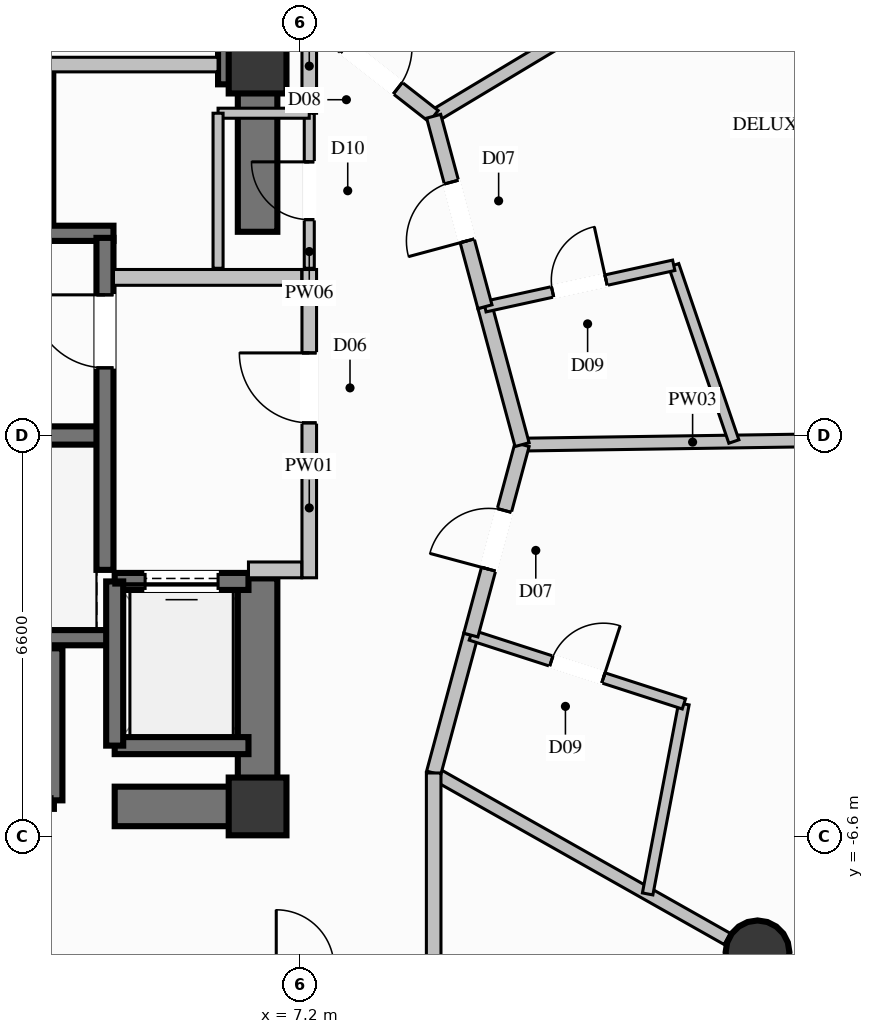
"""IFC4 building model, lengths in metres.
Left out: names, types, materials, properties, quantities, classifications, styles, units other than length and angle.
Written with IfcOpenShell. Run it as: python <this file> out.ifc"""

import sys

from ifc_helpers import new_model, si_unit, direction, frame, frame_2d, origin, origin_2d, place, context, subcontext, project, spatial, rectangle, circle, extrude, element, fill, save


model = new_model("IFC4")
c1 = context("Model", 3, precision=1e-05, world=origin(), true_north=direction((0.0, 1.0)))
c2 = subcontext(c1, "Body", "Model", "MODEL_VIEW")
j1 = project(units=[si_unit("LENGTHUNIT", "METRE"), si_unit("PLANEANGLEUNIT", "RADIAN")], contexts=[c1])
p1 = place(None, origin())
s1 = spatial("IfcSite", under=j1, at=p1, CompositionType="ELEMENT")
p2 = place(p1, origin())
s2 = spatial("IfcBuilding", under=s1, at=p2, CompositionType="ELEMENT")
p3 = place(p2, frame((0.0, 0.0, 124.2)))
s3 = spatial("IfcBuildingStorey", under=s2, at=p3, CompositionType="ELEMENT", Elevation=124.2)
for number, where, z_axis, x_axis in (
    (1, (6.5, -6.1, 0.0), (0.0, 0.0, 1.0), (1.0, 0.0, 0.0)),
    (2, (6.5, 6.1, 0.0), (0.0, 0.0, 1.0), (1.0, 0.0, 0.0)),
):
    element("IfcColumn", number, at=place(p3, frame(where, z_axis=z_axis, x_axis=x_axis)), inside=s3, PredefinedType="COLUMN", context=c2, shape_type="SweptSolid", body=[
        extrude(rectangle(XDim=0.95, YDim=0.95, at=origin_2d()), origin(), (0.0, 0.0, 1.0), 3.6),
    ])
p4 = place(p3, frame((-3.99, 0.0, 0.0), z_axis=(0.0, 0.0, 1.0), x_axis=(1.0, 0.0, 0.0)))
e3 = element("IfcWall", 3, at=p4, inside=s3, PredefinedType="SHEAR", context=c2, shape_type="SweptSolid", body=[
    extrude(rectangle(XDim=7.98, YDim=0.3, at=frame_2d((3.99, 0.0))), origin(), (0.0, 0.0, 1.0), 3.6),
])
for number, where, z_axis, x_axis in (
    (4, (-4.13, -3.325, 0.0), (0.0, 0.0, 1.0), (1.0, 0.0, 0.0)),
    (5, (-4.13, 3.325, 0.0), (0.0, 0.0, 1.0), (1.0, 0.0, 0.0)),
):
    element("IfcWall", number, at=place(p3, frame(where, z_axis=z_axis, x_axis=x_axis)), inside=s3, PredefinedType="SOLIDWALL", context=c2, shape_type="SweptSolid", body=[
        extrude(rectangle(XDim=8.26, YDim=0.25, at=frame_2d((4.13, 0.0))), origin(), (0.0, 0.0, 1.0), 3.6),
    ])
p5 = place(p3, frame((4.15, -6.1, 0.0), z_axis=(0.0, 0.0, 1.0), x_axis=(1.0, 0.0, 0.0)))
e6 = element("IfcWall", 6, at=p5, inside=s3, PredefinedType="SHEAR", context=c2, shape_type="SweptSolid", body=[
    extrude(rectangle(XDim=2.025, YDim=0.65, at=frame_2d((1.013, 0.0))), origin(), (0.0, 0.0, 1.0), 3.6),
])
p6 = place(p3, frame((5.85, 6.1, 0.0), z_axis=(0.0, 0.0, 1.0), x_axis=(1.0, 0.0, 0.0)))
e7 = element("IfcWall", 7, at=p6, inside=s3, PredefinedType="SHEAR", context=c2, shape_type="SweptSolid", body=[
    extrude(rectangle(XDim=0.325, YDim=0.65, at=frame_2d((0.163, 0.0))), origin(), (0.0, 0.0, 1.0), 3.6),
])
p7 = place(p3, frame((6.5, -6.425, 0.0), z_axis=(0.0, 0.0, 1.0), x_axis=(0.0, 1.0, 0.0)))
e8 = element("IfcWall", 8, at=p7, inside=s3, PredefinedType="SHEAR", context=c2, shape_type="SweptSolid", body=[
    extrude(rectangle(XDim=4.075, YDim=0.65, at=frame_2d((2.038, 0.0))), origin(), (0.0, 0.0, 1.0), 3.6),
])
p8 = place(p3, frame((6.5, 3.35, 0.0), z_axis=(0.0, 0.0, 1.0), x_axis=(0.0, 1.0, 0.0)))
e9 = element("IfcWall", 9, at=p8, inside=s3, PredefinedType="SHEAR", context=c2, shape_type="SweptSolid", body=[
    extrude(rectangle(XDim=3.075, YDim=0.65, at=frame_2d((1.538, 0.0))), origin(), (0.0, 0.0, 1.0), 3.6),
])
p9 = place(p3, frame((14.722, -8.5, 0.0), z_axis=(0.0, 0.0, 1.0), x_axis=(1.0, 0.0, 0.0)))
e10 = element("IfcColumn", 10, at=p9, inside=s3, PredefinedType="COLUMN", context=c2, shape_type="SweptSolid", body=[
    extrude(circle(Radius=0.525, at=origin_2d()), origin(), (0.0, 0.0, 1.0), 3.6),
])
p10 = place(p3, frame((1.05, -6.0, 0.0), z_axis=(0.0, 0.0, 1.0), x_axis=(1.0, 0.0, 0.0)))
e11 = element("IfcWall", 11, at=p10, inside=s3, PredefinedType="SOLIDWALL", context=c2, shape_type="SweptSolid", body=[
    extrude(rectangle(XDim=2.1, YDim=0.28, at=frame_2d((1.05, 0.0))), origin(), (0.0, 0.0, 1.0), 3.35),
])
p11 = place(p10, frame((0.5, 0.0, 0.0)))
e12 = element("IfcOpeningElement", 12, at=p11, cuts=e11, PredefinedType="OPENING", context=c2, shape_type="SweptSolid", body=[
    extrude(rectangle(XDim=1.1, YDim=2.2, at=frame_2d((0.55, 1.1))), frame((0.0, 0.15, 0.0), z_axis=(0.0, -1.0, 0.0), x_axis=(1.0, 0.0, 0.0)), (0.0, 0.0, 1.0), 0.3),
])
for number, where, z_axis, x_axis in (
    (13, (3.15, -6.0, 0.0), (0.0, 0.0, 1.0), (0.0, 1.0, 0.0)),
    (14, (3.0, 3.5, 0.0), (0.0, 0.0, 1.0), (0.0, 1.0, 0.0)),
):
    element("IfcWall", number, at=place(p3, frame(where, z_axis=z_axis, x_axis=x_axis)), inside=s3, PredefinedType="SOLIDWALL", context=c2, shape_type="SweptSolid", body=[
        extrude(rectangle(XDim=2.5, YDim=0.28, at=frame_2d((1.25, 0.0))), origin(), (0.0, 0.0, 1.0), 3.35),
    ])
p12 = place(p3, frame((4.15, -5.1, 0.0), z_axis=(0.0, 0.0, 1.0), x_axis=(1.0, 0.0, 0.0)))
e15 = element("IfcWall", 15, at=p12, inside=s3, PredefinedType="SOLIDWALL", context=c2, shape_type="SweptSolid", body=[
    extrude(rectangle(XDim=2.2, YDim=0.28, at=frame_2d((1.1, 0.0))), origin(), (0.0, 0.0, 1.0), 3.35),
])
p13 = place(p3, frame((6.35, -2.4, 0.0), z_axis=(0.0, 0.0, 1.0), x_axis=(-1.0, 0.0, 0.0)))
e16 = element("IfcWall", 16, at=p13, inside=s3, PredefinedType="SOLIDWALL", context=c2, shape_type="SweptSolid", body=[
    extrude(rectangle(XDim=2.2, YDim=0.28, at=frame_2d((1.1, 0.0))), origin(), (0.0, 0.0, 1.0), 3.35),
])
p14 = place(p13, frame((0.5, 0.0, 0.0)))
e17 = element("IfcOpeningElement", 17, at=p14, cuts=e16, PredefinedType="OPENING", context=c2, shape_type="SweptSolid", body=[
    extrude(rectangle(XDim=1.2, YDim=2.2, at=frame_2d((0.6, 1.1))), frame((0.0, 0.15, 0.0), z_axis=(0.0, -1.0, 0.0), x_axis=(1.0, 0.0, 0.0)), (0.0, 0.0, 1.0), 0.3),
])
p15 = place(p3, frame((4.15, -2.4, 0.0), z_axis=(0.0, 0.0, 1.0), x_axis=(0.0, -1.0, 0.0)))
e18 = element("IfcWall", 18, at=p15, inside=s3, PredefinedType="SOLIDWALL", context=c2, shape_type="SweptSolid", body=[
    extrude(rectangle(XDim=2.7, YDim=0.28, at=frame_2d((1.35, 0.0))), origin(), (0.0, 0.0, 1.0), 3.35),
])
p16 = place(p3, frame((3.99, -2.21, 0.0), z_axis=(0.0, 0.0, 1.0), x_axis=(0.0, 1.0, 0.0)))
e19 = element("IfcWall", 19, at=p16, inside=s3, PredefinedType="SOLIDWALL", context=c2, shape_type="SweptSolid", body=[
    extrude(rectangle(XDim=5.46, YDim=0.28, at=frame_2d((2.73, 0.0))), origin(), (0.0, 0.0, 1.0), 3.35),
])
p17 = place(p16, frame((3.323, 0.0, 0.0)))
e20 = element("IfcOpeningElement", 20, at=p17, cuts=e19, PredefinedType="OPENING", context=c2, shape_type="SweptSolid", body=[
    extrude(rectangle(XDim=1.2, YDim=2.2, at=frame_2d((0.6, 1.1))), frame((0.0, 0.15, 0.0), z_axis=(0.0, -1.0, 0.0), x_axis=(1.0, 0.0, 0.0)), (0.0, 0.0, 1.0), 0.3),
])
p18 = place(p3, frame((7.35, -2.34, 0.0), z_axis=(0.0, 0.0, 1.0), x_axis=(0.0, 1.0, 0.0)))
e21 = element("IfcWall", 21, at=p18, inside=s3, PredefinedType="PARTITIONING", context=c2, shape_type="SweptSolid", body=[
    extrude(rectangle(XDim=5.07, YDim=0.24, at=frame_2d((2.535, 0.0))), origin(), (0.0, 0.0, 1.0), 2.435),
])
p19 = place(p18, frame((2.548, 0.0, 0.0)))
e22 = element("IfcOpeningElement", 22, at=p19, cuts=e21, PredefinedType="OPENING", context=c2, shape_type="SweptSolid", body=[
    extrude(rectangle(XDim=1.15, YDim=2.2, at=frame_2d((0.575, 1.1))), frame((0.0, 0.13, 0.0), z_axis=(0.0, -1.0, 0.0), x_axis=(1.0, 0.0, 0.0)), (0.0, 0.0, 1.0), 0.26),
])
p20 = place(p3, frame((6.35, -2.21, 0.0), z_axis=(0.0, 0.0, 1.0), x_axis=(1.0, 0.0, 0.0)))
e23 = element("IfcWall", 23, at=p20, inside=s3, PredefinedType="PARTITIONING", context=c2, shape_type="SweptSolid", body=[
    extrude(rectangle(XDim=0.875, YDim=0.26, at=frame_2d((0.438, 0.0))), origin(), (0.0, 0.0, 1.0), 3.35),
])
p21 = place(p3, frame((4.13, 2.6, 0.0), z_axis=(0.0, 0.0, 1.0), x_axis=(1.0, 0.0, 0.0)))
e24 = element("IfcWall", 24, at=p21, inside=s3, PredefinedType="PARTITIONING", context=c2, shape_type="SweptSolid", body=[
    extrude(rectangle(XDim=3.095, YDim=0.26, at=frame_2d((1.548, 0.0))), origin(), (0.0, 0.0, 1.0), 3.35),
])
p22 = place(p3, frame((7.35, 5.3, 0.0), z_axis=(0.0, 0.0, 1.0), x_axis=(0.0, 1.0, 0.0)))
e25 = element("IfcWall", 25, at=p22, inside=s3, PredefinedType="PARTITIONING", context=c2, shape_type="SweptSolid", body=[
    extrude(rectangle(XDim=1.55, YDim=0.24, at=frame_2d((0.775, 0.0))), origin(), (0.0, 0.0, 1.0), 2.435),
])
p23 = place(p3, frame((3.0, 6.1, 0.0), z_axis=(0.0, 0.0, 1.0), x_axis=(1.0, 0.0, 0.0)))
e26 = element("IfcWall", 26, at=p23, inside=s3, PredefinedType="PARTITIONING", context=c2, shape_type="SweptSolid", body=[
    extrude(rectangle(XDim=2.85, YDim=0.24, at=frame_2d((1.425, 0.0))), origin(), (0.0, 0.0, 1.0), 2.435),
])
p24 = place(p3, frame((7.35, 2.75, 0.0), z_axis=(0.0, 0.0, 1.0), x_axis=(0.0, 1.0, 0.0)))
e27 = element("IfcWall", 27, at=p24, inside=s3, PredefinedType="PARTITIONING", context=c2, shape_type="SweptSolid", body=[
    extrude(rectangle(XDim=2.55, YDim=0.165, at=frame_2d((1.275, 0.0))), origin(), (0.0, 0.0, 1.0), 3.35),
])
p25 = place(p24, frame((0.8, 0.0, 0.0)))
e28 = element("IfcOpeningElement", 28, at=p25, cuts=e27, PredefinedType="OPENING", context=c2, shape_type="SweptSolid", body=[
    extrude(rectangle(XDim=0.95, YDim=2.1, at=frame_2d((0.475, 1.05))), frame((0.0, 0.093, 0.0), z_axis=(0.0, -1.0, 0.0), x_axis=(1.0, 0.0, 0.0)), (0.0, 0.0, 1.0), 0.185),
])
p26 = place(p3, frame((7.35, 5.3, 0.0), z_axis=(0.0, 0.0, 1.0), x_axis=(-1.0, 0.0, 0.0)))
e29 = element("IfcWall", 29, at=p26, inside=s3, PredefinedType="PARTITIONING", context=c2, shape_type="SweptSolid", body=[
    extrude(rectangle(XDim=1.5, YDim=0.165, at=frame_2d((0.75, 0.0))), origin(), (0.0, 0.0, 1.0), 2.435),
])
p27 = place(p3, frame((5.85, 5.3, 0.0), z_axis=(0.0, 0.0, 1.0), x_axis=(0.0, -1.0, 0.0)))
e30 = element("IfcWall", 30, at=p27, inside=s3, PredefinedType="PARTITIONING", context=c2, shape_type="SweptSolid", body=[
    extrude(rectangle(XDim=2.55, YDim=0.165, at=frame_2d((1.275, 0.0))), origin(), (0.0, 0.0, 1.0), 2.435),
])
p28 = place(p3, frame((10.85, -0.15, 0.0), z_axis=(0.0, 0.0, 1.0), x_axis=(0.999893703948, 0.014580151076, 0.0)))
e31 = element("IfcWall", 31, at=p28, inside=s3, PredefinedType="PARTITIONING", context=c2, shape_type="SweptSolid", body=[
    extrude(rectangle(XDim=5.609, YDim=0.21, at=frame_2d((2.805, 0.0))), origin(), (0.0, 0.0, 1.0), 3.35),
])
p29 = place(p3, frame((9.396, 5.25, 0.0), z_axis=(0.0, 0.0, 1.0), x_axis=(0.857379456535, 0.514684823471, 0.0)))
e32 = element("IfcWall", 32, at=p29, inside=s3, PredefinedType="PARTITIONING", context=c2, shape_type="SweptSolid", body=[
    extrude(rectangle(XDim=5.697, YDim=0.21, at=frame_2d((2.848, 0.0))), origin(), (0.0, 0.0, 1.0), 2.791),
])
p30 = place(p3, frame((9.396, -5.55, 0.0), z_axis=(0.0, 0.0, 1.0), x_axis=(0.870557919432, -0.492065959922, 0.0)))
e33 = element("IfcWall", 33, at=p30, inside=s3, PredefinedType="PARTITIONING", context=c2, shape_type="SweptSolid", body=[
    extrude(rectangle(XDim=5.546, YDim=0.21, at=frame_2d((2.773, 0.0))), origin(), (0.0, 0.0, 1.0), 2.791),
])
p31 = place(p3, frame((7.35, 6.85, 0.0), z_axis=(0.0, 0.0, 1.0), x_axis=(0.7876993483, -0.6160598483, 0.0)))
e34 = element("IfcWall", 34, at=p31, inside=s3, PredefinedType="PARTITIONING", context=c2, shape_type="SweptSolid", body=[
    extrude(rectangle(XDim=2.597, YDim=0.24, at=frame_2d((1.299, 0.0))), origin(), (0.0, 0.0, 1.0), 3.35),
])
p32 = place(p31, frame((0.749, 0.0, 0.0)))
e35 = element("IfcOpeningElement", 35, at=p32, cuts=e34, PredefinedType="OPENING", context=c2, shape_type="SweptSolid", body=[
    extrude(rectangle(XDim=1.1, YDim=2.3, at=frame_2d((0.55, 1.15))), frame((0.0, 0.13, 0.0), z_axis=(0.0, -1.0, 0.0), x_axis=(1.0, 0.0, 0.0)), (0.0, 0.0, 1.0), 0.26),
])
p33 = place(p3, frame((9.396, -5.55, 0.0), z_axis=(0.0, 0.0, 1.0), x_axis=(0.260152382661, 0.965567572879, 0.0)))
e36 = element("IfcWall", 36, at=p33, inside=s3, PredefinedType="PARTITIONING", context=c2, shape_type="SweptSolid", body=[
    extrude(rectangle(XDim=2.349, YDim=0.24, at=frame_2d((1.174, 0.0))), origin(), (0.0, 0.0, 1.0), 3.35),
])
p34 = place(p3, frame((12.915, -7.539, 0.0), z_axis=(0.0, 0.0, 1.0), x_axis=(0.187327216093, 0.982297569024, 0.0)))
e37 = element("IfcWall", 37, at=p34, inside=s3, PredefinedType="PLUMBINGWALL", context=c2, shape_type="SweptSolid", body=[
    extrude(rectangle(XDim=3.181, YDim=0.175, at=frame_2d((1.591, 0.0))), origin(), (0.0, 0.0, 1.0), 3.35),
])
p35 = place(p3, frame((10.007, -3.282, 0.0), z_axis=(0.0, 0.0, 1.0), x_axis=(0.951566663579, -0.307442490177, 0.0)))
e38 = element("IfcWall", 38, at=p35, inside=s3, PredefinedType="PLUMBINGWALL", context=c2, shape_type="SweptSolid", body=[
    extrude(rectangle(XDim=3.682, YDim=0.175, at=frame_2d((1.841, 0.0))), origin(), (0.0, 0.0, 1.0), 3.35),
])
p36 = place(p35, frame((1.391, 0.0, 0.0)))
e39 = element("IfcOpeningElement", 39, at=p36, cuts=e38, PredefinedType="OPENING", context=c2, shape_type="SweptSolid", body=[
    extrude(rectangle(XDim=0.9, YDim=2.1, at=frame_2d((0.45, 1.05))), frame((0.0, 0.098, 0.0), z_axis=(0.0, -1.0, 0.0), x_axis=(1.0, 0.0, 0.0)), (0.0, 0.0, 1.0), 0.195),
])
p37 = place(p3, frame((10.007, -3.282, 0.0), z_axis=(0.0, 0.0, 1.0), x_axis=(0.259905989708, 0.965633924691, 0.0)))
e40 = element("IfcWall", 40, at=p37, inside=s3, PredefinedType="PARTITIONING", context=c2, shape_type="SweptSolid", body=[
    extrude(rectangle(XDim=3.244, YDim=0.24, at=frame_2d((1.622, 0.0))), origin(), (0.0, 0.0, 1.0), 2.985),
])
p38 = place(p37, frame((1.122, 0.0, 0.0)))
e41 = element("IfcOpeningElement", 41, at=p38, cuts=e40, PredefinedType="OPENING", context=c2, shape_type="SweptSolid", body=[
    extrude(rectangle(XDim=1.0, YDim=2.2, at=frame_2d((0.5, 1.1))), frame((0.0, 0.13, 0.0), z_axis=(0.0, -1.0, 0.0), x_axis=(1.0, 0.0, 0.0)), (0.0, 0.0, 1.0), 0.26),
])
p39 = place(p3, frame((10.85, -0.15, 0.0), z_axis=(0.0, 0.0, 1.0), x_axis=(-0.260178493416, 0.965560537493, 0.0)))
e42 = element("IfcWall", 42, at=p39, inside=s3, PredefinedType="PARTITIONING", context=c2, shape_type="SweptSolid", body=[
    extrude(rectangle(XDim=2.349, YDim=0.24, at=frame_2d((1.174, 0.0))), origin(), (0.0, 0.0, 1.0), 2.985),
])
p40 = place(p3, frame((14.333, -0.099, 0.0), z_axis=(0.0, 0.0, 1.0), x_axis=(-0.322964477687, 0.946411087294, 0.0)))
e43 = element("IfcWall", 43, at=p40, inside=s3, PredefinedType="PLUMBINGWALL", context=c2, shape_type="SweptSolid", body=[
    extrude(rectangle(XDim=3.062, YDim=0.175, at=frame_2d((1.531, 0.0))), origin(), (0.0, 0.0, 1.0), 3.35),
])
p41 = place(p3, frame((10.239, 2.118, 0.0), z_axis=(0.0, 0.0, 1.0), x_axis=(0.976772579837, 0.214278620675, 0.0)))
e44 = element("IfcWall", 44, at=p41, inside=s3, PredefinedType="PLUMBINGWALL", context=c2, shape_type="SweptSolid", body=[
    extrude(rectangle(XDim=3.179, YDim=0.175, at=frame_2d((1.589, 0.0))), origin(), (0.0, 0.0, 1.0), 3.35),
])
p42 = place(p41, frame((1.139, 0.0, 0.0)))
e45 = element("IfcOpeningElement", 45, at=p42, cuts=e44, PredefinedType="OPENING", context=c2, shape_type="SweptSolid", body=[
    extrude(rectangle(XDim=0.9, YDim=2.1, at=frame_2d((0.45, 1.05))), frame((0.0, 0.098, 0.0), z_axis=(0.0, -1.0, 0.0), x_axis=(1.0, 0.0, 0.0)), (0.0, 0.0, 1.0), 0.195),
])
p43 = place(p3, frame((10.239, 2.118, 0.0), z_axis=(0.0, 0.0, 1.0), x_axis=(-0.259905989708, 0.965633924691, 0.0)))
e46 = element("IfcWall", 46, at=p43, inside=s3, PredefinedType="PARTITIONING", context=c2, shape_type="SweptSolid", body=[
    extrude(rectangle(XDim=3.244, YDim=0.24, at=frame_2d((1.622, 0.0))), origin(), (0.0, 0.0, 1.0), 3.35),
])
p44 = place(p43, frame((1.122, 0.0, 0.0)))
e47 = element("IfcOpeningElement", 47, at=p44, cuts=e46, PredefinedType="OPENING", context=c2, shape_type="SweptSolid", body=[
    extrude(rectangle(XDim=1.0, YDim=2.2, at=frame_2d((0.5, 1.1))), frame((0.0, 0.13, 0.0), z_axis=(0.0, -1.0, 0.0), x_axis=(1.0, 0.0, 0.0)), (0.0, 0.0, 1.0), 0.26),
])
p45 = place(p3, frame((9.396, -8.75, 0.0), z_axis=(0.0, 0.0, 1.0), x_axis=(0.0, 1.0, 0.0)))
e48 = element("IfcWall", 48, at=p45, inside=s3, PredefinedType="PARTITIONING", context=c2, shape_type="SweptSolid", body=[
    extrude(rectangle(XDim=3.2, YDim=0.24, at=frame_2d((1.6, 0.0))), origin(), (0.0, 0.0, 1.0), 3.35),
])
p46 = place(p14, origin())
e49 = element("IfcDoor", 49, at=p46, inside=s3, OperationType="SLIDING_TO_LEFT", PredefinedType="DOOR", context=c2, shape_type="SweptSolid", body=[
    extrude(rectangle(XDim=1.2, YDim=2.2, at=frame_2d((0.6, 1.1))), frame((0.0, 0.025, 0.0), z_axis=(0.0, -1.0, 0.0), x_axis=(1.0, 0.0, 0.0)), (0.0, 0.0, 1.0), 0.05),
])
fill(e17, e49)
p47 = place(p17, origin())
e50 = element("IfcDoor", 50, at=p47, inside=s3, OperationType="SINGLE_SWING_RIGHT", PredefinedType="DOOR", context=c2, shape_type="SweptSolid", body=[
    extrude(rectangle(XDim=1.2, YDim=2.2, at=frame_2d((0.6, 1.1))), frame((0.0, 0.025, 0.0), z_axis=(0.0, -1.0, 0.0), x_axis=(1.0, 0.0, 0.0)), (0.0, 0.0, 1.0), 0.05),
])
fill(e20, e50)
p48 = place(p19, origin())
e51 = element("IfcDoor", 51, at=p48, inside=s3, OperationType="SINGLE_SWING_RIGHT", PredefinedType="DOOR", context=c2, shape_type="SweptSolid", body=[
    extrude(rectangle(XDim=1.15, YDim=2.2, at=frame_2d((0.575, 1.1))), frame((0.0, 0.025, 0.0), z_axis=(0.0, -1.0, 0.0), x_axis=(1.0, 0.0, 0.0)), (0.0, 0.0, 1.0), 0.05),
])
fill(e22, e51)
p49 = place(p25, origin())
e52 = element("IfcDoor", 52, at=p49, inside=s3, OperationType="SINGLE_SWING_RIGHT", PredefinedType="DOOR", context=c2, shape_type="SweptSolid", body=[
    extrude(rectangle(XDim=0.95, YDim=2.1, at=frame_2d((0.475, 1.05))), frame((0.0, 0.025, 0.0), z_axis=(0.0, -1.0, 0.0), x_axis=(1.0, 0.0, 0.0)), (0.0, 0.0, 1.0), 0.05),
])
fill(e28, e52)
p50 = place(p32, origin())
e53 = element("IfcDoor", 53, at=p50, inside=s3, OperationType="SINGLE_SWING_LEFT", PredefinedType="DOOR", context=c2, shape_type="SweptSolid", body=[
    extrude(rectangle(XDim=1.1, YDim=2.3, at=frame_2d((0.55, 1.15))), frame((0.0, 0.025, 0.0), z_axis=(0.0, -1.0, 0.0), x_axis=(1.0, 0.0, 0.0)), (0.0, 0.0, 1.0), 0.05),
])
fill(e35, e53)
p51 = place(p36, origin())
e54 = element("IfcDoor", 54, at=p51, inside=s3, OperationType="SINGLE_SWING_RIGHT", PredefinedType="DOOR", context=c2, shape_type="SweptSolid", body=[
    extrude(rectangle(XDim=0.9, YDim=2.1, at=frame_2d((0.45, 1.05))), frame((0.0, 0.025, 0.0), z_axis=(0.0, -1.0, 0.0), x_axis=(1.0, 0.0, 0.0)), (0.0, 0.0, 1.0), 0.05),
])
fill(e39, e54)
p52 = place(p38, origin())
e55 = element("IfcDoor", 55, at=p52, inside=s3, OperationType="SINGLE_SWING_LEFT", PredefinedType="DOOR", context=c2, shape_type="SweptSolid", body=[
    extrude(rectangle(XDim=1.0, YDim=2.2, at=frame_2d((0.5, 1.1))), frame((0.0, 0.025, 0.0), z_axis=(0.0, -1.0, 0.0), x_axis=(1.0, 0.0, 0.0)), (0.0, 0.0, 1.0), 0.05),
])
fill(e41, e55)
p53 = place(p42, origin())
e56 = element("IfcDoor", 56, at=p53, inside=s3, OperationType="SINGLE_SWING_RIGHT", PredefinedType="DOOR", context=c2, shape_type="SweptSolid", body=[
    extrude(rectangle(XDim=0.9, YDim=2.1, at=frame_2d((0.45, 1.05))), frame((0.0, 0.025, 0.0), z_axis=(0.0, -1.0, 0.0), x_axis=(1.0, 0.0, 0.0)), (0.0, 0.0, 1.0), 0.05),
])
fill(e45, e56)
p54 = place(p44, origin())
e57 = element("IfcDoor", 57, at=p54, inside=s3, OperationType="SINGLE_SWING_LEFT", PredefinedType="DOOR", context=c2, shape_type="SweptSolid", body=[
    extrude(rectangle(XDim=1.0, YDim=2.2, at=frame_2d((0.5, 1.1))), frame((0.0, 0.025, 0.0), z_axis=(0.0, -1.0, 0.0), x_axis=(1.0, 0.0, 0.0)), (0.0, 0.0, 1.0), 0.05),
])
fill(e47, e57)
save(model, sys.argv[1])
